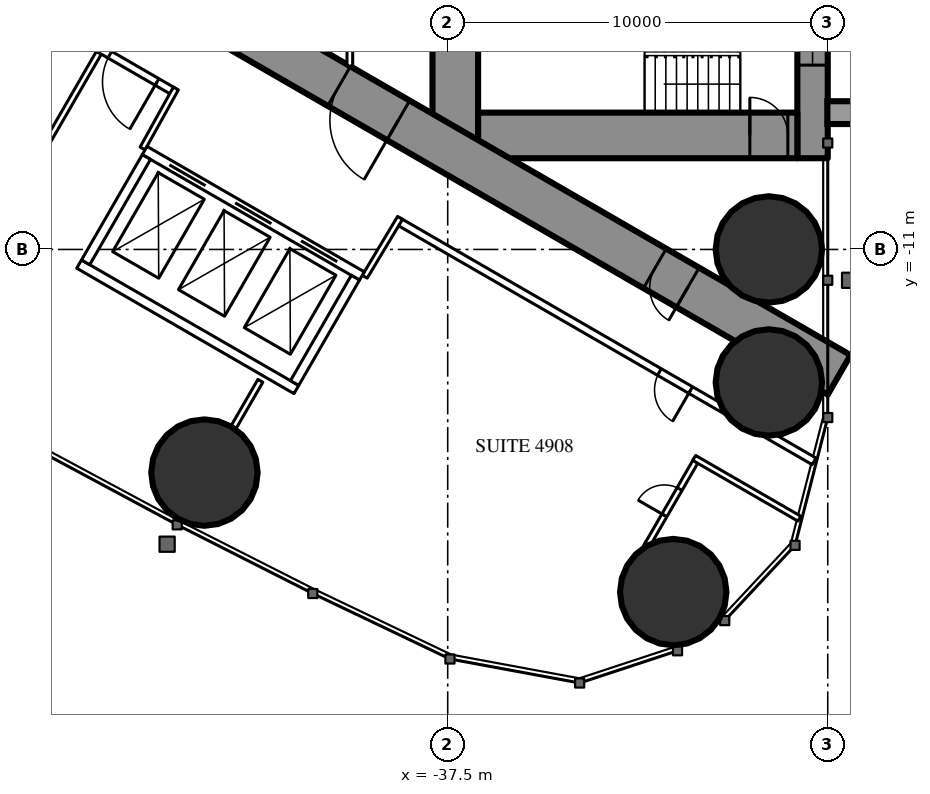
"""IFC4 building model, lengths in metres.
Left out: names, types, materials, properties, quantities, classifications, styles, units other than length and angle.
Written with IfcOpenShell. Run it as: python <this file> out.ifc"""

import sys

from ifc_helpers import new_model, si_unit, direction, frame, frame_2d, origin, origin_2d, place, context, subcontext, project, spatial, rectangle, circle, extrude, element, fill, save


model = new_model("IFC4")
c1 = context("Model", 3, precision=1e-05, world=origin(), true_north=direction((0.0, 1.0)))
c2 = subcontext(c1, "Body", "Model", "MODEL_VIEW")
j1 = project(units=[si_unit("LENGTHUNIT", "METRE"), si_unit("PLANEANGLEUNIT", "RADIAN")], contexts=[c1])
p1 = place(None, origin())
s1 = spatial("IfcSite", under=j1, at=p1, CompositionType="ELEMENT")
p2 = place(p1, origin())
s2 = spatial("IfcBuilding", under=s1, at=p2, CompositionType="ELEMENT")
p3 = place(p2, frame((0.0, 0.0, 184.3)))
s3 = spatial("IfcBuildingStorey", under=s2, at=p3, CompositionType="ELEMENT", Elevation=184.3)
for number, where, z_axis, x_axis in (
    (1, (-31.565, -20.016, 0.0), (0.0, 0.0, 1.0), (1.0, 0.0, 0.0)),
    (2, (-29.05, -11.0, 0.0), (0.0, 0.0, 1.0), (1.0, 0.0, 0.0)),
    (3, (-29.05, -14.5, 0.0), (0.0, 0.0, 1.0), (1.0, 0.0, 0.0)),
    (4, (-43.9, -16.871, 0.0), (0.0, 0.0, 1.0), (1.0, 0.0, 0.0)),
):
    element("IfcColumn", number, at=place(p3, frame(where, z_axis=z_axis, x_axis=x_axis)), inside=s3, PredefinedType="COLUMN", context=c2, shape_type="SweptSolid", body=[
        extrude(circle(Radius=1.4, at=origin_2d()), origin(), (0.0, 0.0, 1.0), 3.5),
    ])
p4 = place(p3, frame((-27.9, 8.6, 0.0), z_axis=(0.0, 0.0, 1.0), x_axis=(0.0, -1.0, 0.0)))
e5 = element("IfcWall", 5, at=p4, inside=s3, PredefinedType="SHEAR", context=c2, shape_type="SweptSolid", body=[
    extrude(rectangle(XDim=17.2, YDim=0.8, at=frame_2d((8.6, 0.0))), origin(), (0.0, 0.0, 1.0), 3.5),
])
p5 = place(p4, frame((2.45, 0.0, 0.6)))
e6 = element("IfcOpeningElement", 6, at=p5, cuts=e5, PredefinedType="OPENING", context=c2, shape_type="SweptSolid", body=[
    extrude(rectangle(XDim=0.6, YDim=2.1, at=frame_2d((0.3, 1.05))), frame((0.0, 0.41, 0.0), z_axis=(0.0, -1.0, 0.0), x_axis=(1.0, 0.0, 0.0)), (0.0, 0.0, 1.0), 0.82),
])
p6 = place(p4, frame((14.15, 0.0, 0.6)))
e7 = element("IfcOpeningElement", 7, at=p6, cuts=e5, PredefinedType="OPENING", context=c2, shape_type="SweptSolid", body=[
    extrude(rectangle(XDim=0.6, YDim=2.1, at=frame_2d((0.3, 1.05))), frame((0.0, 0.41, 0.0), z_axis=(0.0, -1.0, 0.0), x_axis=(1.0, 0.0, 0.0)), (0.0, 0.0, 1.0), 0.82),
])
p7 = place(p3, frame((-37.3, 8.6, 0.0), z_axis=(0.0, 0.0, 1.0), x_axis=(0.0, -1.0, 0.0)))
e8 = element("IfcWall", 8, at=p7, inside=s3, PredefinedType="SHEAR", context=c2, shape_type="SweptSolid", body=[
    extrude(rectangle(XDim=17.2, YDim=1.2, at=frame_2d((8.6, 0.0))), origin(), (0.0, 0.0, 1.0), 3.5),
])
p8 = place(p7, frame((7.7, 0.0, 0.0)))
e9 = element("IfcOpeningElement", 9, at=p8, cuts=e8, PredefinedType="OPENING", context=c2, shape_type="SweptSolid", body=[
    extrude(rectangle(XDim=1.8, YDim=2.2, at=frame_2d((0.9, 1.1))), frame((0.0, 0.61, 0.0), z_axis=(0.0, -1.0, 0.0), x_axis=(1.0, 0.0, 0.0)), (0.0, 0.0, 1.0), 1.22),
])
p9 = place(p3, frame((-28.3, -8.0, 0.0), z_axis=(0.0, 0.0, 1.0), x_axis=(-1.0, 0.0, 0.0)))
e10 = element("IfcWall", 10, at=p9, inside=s3, PredefinedType="SHEAR", context=c2, shape_type="SweptSolid", body=[
    extrude(rectangle(XDim=8.4, YDim=1.2, at=frame_2d((4.2, 0.0))), origin(), (0.0, 0.0, 1.0), 3.5),
])
p10 = place(p9, frame((0.25, 0.0, 0.0)))
e11 = element("IfcOpeningElement", 11, at=p10, cuts=e10, PredefinedType="OPENING", context=c2, shape_type="SweptSolid", body=[
    extrude(rectangle(XDim=1.0, YDim=2.2, at=frame_2d((0.5, 1.1))), frame((0.0, 0.61, 0.0), z_axis=(0.0, -1.0, 0.0), x_axis=(1.0, 0.0, 0.0)), (0.0, 0.0, 1.0), 1.22),
])
p11 = place(p3, frame((-27.2, -14.3, 0.0), z_axis=(0.0, 0.0, 1.0), x_axis=(-0.866024021859, 0.500002393557, 0.0)))
e12 = element("IfcWall", 12, at=p11, inside=s3, PredefinedType="SHEAR", context=c2, shape_type="SweptSolid", body=[
    extrude(rectangle(XDim=27.907, YDim=1.2, at=frame_2d((13.954, 0.0))), origin(), (0.0, 0.0, 1.0), 3.5),
])
p12 = place(p11, frame((4.6, 0.0, 0.0)))
e13 = element("IfcOpeningElement", 13, at=p12, cuts=e12, PredefinedType="OPENING", context=c2, shape_type="SweptSolid", body=[
    extrude(rectangle(XDim=1.0, YDim=2.2, at=frame_2d((0.5, 1.1))), frame((0.0, 0.61, 0.0), z_axis=(0.0, -1.0, 0.0), x_axis=(1.0, 0.0, 0.0)), (0.0, 0.0, 1.0), 1.22),
])
p13 = place(p11, frame((13.395, 0.0, 0.0)))
e14 = element("IfcOpeningElement", 14, at=p13, cuts=e12, PredefinedType="OPENING", context=c2, shape_type="SweptSolid", body=[
    extrude(rectangle(XDim=1.8, YDim=2.2, at=frame_2d((0.9, 1.1))), frame((0.0, 0.61, 0.0), z_axis=(0.0, -1.0, 0.0), x_axis=(1.0, 0.0, 0.0)), (0.0, 0.0, 1.0), 1.22),
])
p14 = place(p3, frame((-46.679, -5.825, 0.0), z_axis=(0.0, 0.0, 1.0), x_axis=(-0.500006839597, -0.866021454905, 0.0)))
e15 = element("IfcWall", 15, at=p14, inside=s3, PredefinedType="PARTITIONING", context=c2, shape_type="SweptSolid", body=[
    extrude(rectangle(XDim=6.911, YDim=0.15, at=frame_2d((3.456, 0.0))), origin(), (0.0, 0.0, 1.0), 2.3),
])
p15 = place(p3, frame((-42.429, -14.457, 0.0), z_axis=(0.0, 0.0, 1.0), x_axis=(-0.5000578829, -0.865991982497, 0.0)))
e16 = element("IfcWall", 16, at=p15, inside=s3, PredefinedType="PARTITIONING", context=c2, shape_type="SweptSolid", body=[
    extrude(rectangle(XDim=1.407, YDim=0.15, at=frame_2d((0.704, 0.0))), origin(), (0.0, 0.0, 1.0), 3.25),
])
p16 = place(p3, frame((-27.86, -16.575, 0.0), z_axis=(0.0, 0.0, 1.0), x_axis=(-0.866027756871, 0.499995924312, 0.0)))
e17 = element("IfcWall", 17, at=p16, inside=s3, PredefinedType="PARTITIONING", context=c2, shape_type="SweptSolid", body=[
    extrude(rectangle(XDim=12.622, YDim=0.2, at=frame_2d((6.311, 0.0))), origin(), (0.0, 0.0, 1.0), 3.25),
])
p17 = place(p16, frame((3.75, 0.0, 0.0)))
e18 = element("IfcOpeningElement", 18, at=p17, cuts=e17, PredefinedType="OPENING", context=c2, shape_type="SweptSolid", body=[
    extrude(rectangle(XDim=0.95, YDim=2.2, at=frame_2d((0.475, 1.1))), frame((0.0, 0.11, 0.0), z_axis=(0.0, -1.0, 0.0), x_axis=(1.0, 0.0, 0.0)), (0.0, 0.0, 1.0), 0.22),
])
p18 = place(p3, frame((-44.715, -6.844, 0.0), z_axis=(0.0, 0.0, 1.0), x_axis=(-0.866025261224, 0.500000246922, 0.0)))
e19 = element("IfcWall", 19, at=p18, inside=s3, PredefinedType="PARTITIONING", context=c2, shape_type="SweptSolid", body=[
    extrude(rectangle(XDim=13.567, YDim=0.2, at=frame_2d((6.783, 0.0))), origin(), (0.0, 0.0, 1.0), 3.25),
])
p19 = place(p18, frame((10.579, 0.0, 0.0)))
e20 = element("IfcOpeningElement", 20, at=p19, cuts=e19, PredefinedType="OPENING", context=c2, shape_type="SweptSolid", body=[
    extrude(rectangle(XDim=0.95, YDim=2.2, at=frame_2d((0.475, 1.1))), frame((0.0, 0.11, 0.0), z_axis=(0.0, -1.0, 0.0), x_axis=(1.0, 0.0, 0.0)), (0.0, 0.0, 1.0), 0.22),
])
p20 = place(p18, frame((6.529, 0.0, 0.0)))
e21 = element("IfcOpeningElement", 21, at=p20, cuts=e19, PredefinedType="OPENING", context=c2, shape_type="SweptSolid", body=[
    extrude(rectangle(XDim=0.95, YDim=2.2, at=frame_2d((0.475, 1.1))), frame((0.0, 0.11, 0.0), z_axis=(0.0, -1.0, 0.0), x_axis=(1.0, 0.0, 0.0)), (0.0, 0.0, 1.0), 0.22),
])
p21 = place(p18, frame((0.5, 0.0, 0.0)))
e22 = element("IfcOpeningElement", 22, at=p21, cuts=e19, PredefinedType="OPENING", context=c2, shape_type="SweptSolid", body=[
    extrude(rectangle(XDim=1.435, YDim=2.2, at=frame_2d((0.718, 1.1))), frame((0.0, 0.11, 0.0), z_axis=(0.0, -1.0, 0.0), x_axis=(1.0, 0.0, 0.0)), (0.0, 0.0, 1.0), 0.22),
])
for number, where, z_axis, x_axis in (
    (23, (-39.683, -11.718, 0.0), (0.0, 0.0, 1.0), (0.514, 0.858, 0.0)),
    (24, (-44.652, -6.764, 0.0), (0.0, 0.0, 1.0), (-0.485, -0.874, 0.0)),
):
    element("IfcWall", number, at=place(p3, frame(where, z_axis=z_axis, x_axis=x_axis)), inside=s3, PredefinedType="PARTITIONING", context=c2, shape_type="SweptSolid", body=[
        extrude(rectangle(XDim=1.805, YDim=0.15, at=frame_2d((0.903, 0.0))), origin(), (0.0, 0.0, 1.0), 3.25),
    ])
p22 = place(p3, frame((-30.17, -19.975, 0.0), z_axis=(0.0, 0.0, 1.0), x_axis=(-0.866006523861, 0.500032699561, 0.0)))
e25 = element("IfcWall", 25, at=p22, inside=s3, PredefinedType="PARTITIONING", context=c2, shape_type="SweptSolid", body=[
    extrude(rectangle(XDim=2.475, YDim=0.15, at=frame_2d((1.237, 0.0))), origin(), (0.0, 0.0, 1.0), 3.25),
])
p23 = place(p3, frame((-30.948, -16.524, 0.0), z_axis=(0.0, 0.0, 1.0), x_axis=(-0.500006934395, -0.866021400173, 0.0)))
e26 = element("IfcWall", 26, at=p23, inside=s3, PredefinedType="PARTITIONING", context=c2, shape_type="SweptSolid", body=[
    extrude(rectangle(XDim=2.6, YDim=0.15, at=frame_2d((1.3, 0.0))), origin(), (0.0, 0.0, 1.0), 2.3),
])
p24 = place(p23, frame((0.9, 0.0, 0.0)))
e27 = element("IfcOpeningElement", 27, at=p24, cuts=e26, PredefinedType="OPENING", context=c2, shape_type="SweptSolid", body=[
    extrude(rectangle(XDim=0.8, YDim=2.2, at=frame_2d((0.4, 1.1))), frame((0.0, 0.085, 0.0), z_axis=(0.0, -1.0, 0.0), x_axis=(1.0, 0.0, 0.0)), (0.0, 0.0, 1.0), 0.17),
])
p25 = place(p3, frame((-28.246, -18.084, 0.0), z_axis=(0.0, 0.0, 1.0), x_axis=(-0.866029063467, 0.49999366119, 0.0)))
e28 = element("IfcWall", 28, at=p25, inside=s3, PredefinedType="PARTITIONING", context=c2, shape_type="SweptSolid", body=[
    extrude(rectangle(XDim=3.195, YDim=0.15, at=frame_2d((1.597, 0.0))), origin(), (0.0, 0.0, 1.0), 3.25),
])
p26 = place(p3, frame((-40.075, 1.2, 0.0), z_axis=(0.0, 0.0, 1.0), x_axis=(0.0, -1.0, 0.0)))
e29 = element("IfcWall", 29, at=p26, inside=s3, PredefinedType="PARTITIONING", context=c2, shape_type="SweptSolid", body=[
    extrude(rectangle(XDim=7.374, YDim=0.15, at=frame_2d((3.687, 0.0))), origin(), (0.0, 0.0, 1.0), 3.25),
])
p27 = place(p26, frame((2.787, 0.0, 0.0)))
e30 = element("IfcOpeningElement", 30, at=p27, cuts=e29, PredefinedType="OPENING", context=c2, shape_type="SweptSolid", body=[
    extrude(rectangle(XDim=1.8, YDim=2.2, at=frame_2d((0.9, 1.1))), frame((0.0, 0.085, 0.0), z_axis=(0.0, -1.0, 0.0), x_axis=(1.0, 0.0, 0.0)), (0.0, 0.0, 1.0), 0.17),
])
p28 = place(p3, frame((-39.758, -11.697, 0.0), z_axis=(0.0, 0.0, 1.0), x_axis=(-0.866024194504, 0.500002094529, 0.0)))
e31 = element("IfcWall", 31, at=p28, inside=s3, PredefinedType="PARTITIONING", context=c2, shape_type="SweptSolid", body=[
    extrude(rectangle(XDim=6.6, YDim=0.25, at=frame_2d((3.3, 0.0))), origin(), (0.0, 0.0, 1.0), 3.25),
])
p29 = place(p28, frame((0.75, 0.0, 0.0)))
e32 = element("IfcOpeningElement", 32, at=p29, cuts=e31, PredefinedType="OPENING", context=c2, shape_type="SweptSolid", body=[
    extrude(rectangle(XDim=1.1, YDim=2.2, at=frame_2d((0.55, 1.1))), frame((0.0, 0.135, 0.0), z_axis=(0.0, -1.0, 0.0), x_axis=(1.0, 0.0, 0.0)), (0.0, 0.0, 1.0), 0.27),
])
p30 = place(p28, frame((2.75, 0.0, 0.0)))
e33 = element("IfcOpeningElement", 33, at=p30, cuts=e31, PredefinedType="OPENING", context=c2, shape_type="SweptSolid", body=[
    extrude(rectangle(XDim=1.1, YDim=2.2, at=frame_2d((0.55, 1.1))), frame((0.0, 0.135, 0.0), z_axis=(0.0, -1.0, 0.0), x_axis=(1.0, 0.0, 0.0)), (0.0, 0.0, 1.0), 0.27),
])
p31 = place(p28, frame((4.75, 0.0, 0.0)))
e34 = element("IfcOpeningElement", 34, at=p31, cuts=e31, PredefinedType="OPENING", context=c2, shape_type="SweptSolid", body=[
    extrude(rectangle(XDim=1.1, YDim=2.2, at=frame_2d((0.55, 1.1))), frame((0.0, 0.135, 0.0), z_axis=(0.0, -1.0, 0.0), x_axis=(1.0, 0.0, 0.0)), (0.0, 0.0, 1.0), 0.27),
])
p32 = place(p3, frame((-41.482, -14.686, 0.0), z_axis=(0.0, 0.0, 1.0), x_axis=(-0.86603344179, 0.499986077507, 0.0)))
e35 = element("IfcWall", 35, at=p32, inside=s3, PredefinedType="PARTITIONING", context=c2, shape_type="SweptSolid", body=[
    extrude(rectangle(XDim=6.6, YDim=0.25, at=frame_2d((3.3, 0.0))), origin(), (0.0, 0.0, 1.0), 3.25),
])
for number, where, z_axis, x_axis in (
    (36, (-39.928, -11.743, 0.0), (0.0, 0.0, 1.0), (-0.5, -0.866, 0.0)),
    (37, (-45.428, -8.568, 0.0), (0.0, 0.0, 1.0), (-0.5, -0.866, 0.0)),
):
    element("IfcWall", number, at=place(p3, frame(where, z_axis=z_axis, x_axis=x_axis)), inside=s3, PredefinedType="PARTITIONING", context=c2, shape_type="SweptSolid", body=[
        extrude(rectangle(XDim=3.201, YDim=0.25, at=frame_2d((1.6, 0.0))), origin(), (0.0, 0.0, 1.0), 3.25),
    ])
p33 = place(p24, origin())
e38 = element("IfcDoor", 38, at=p33, inside=s3, OperationType="SINGLE_SWING_RIGHT", PredefinedType="DOOR", context=c2, shape_type="SweptSolid", body=[
    extrude(rectangle(XDim=0.8, YDim=2.2, at=frame_2d((0.4, 1.1))), frame((0.0, 0.025, 0.0), z_axis=(0.0, -1.0, 0.0), x_axis=(1.0, 0.0, 0.0)), (0.0, 0.0, 1.0), 0.05),
])
fill(e27, e38)
p34 = place(p17, origin())
e39 = element("IfcDoor", 39, at=p34, inside=s3, OperationType="SINGLE_SWING_LEFT", PredefinedType="DOOR", context=c2, shape_type="SweptSolid", body=[
    extrude(rectangle(XDim=0.95, YDim=2.2, at=frame_2d((0.475, 1.1))), frame((0.0, 0.025, 0.0), z_axis=(0.0, -1.0, 0.0), x_axis=(1.0, 0.0, 0.0)), (0.0, 0.0, 1.0), 0.05),
])
fill(e18, e39)
p35 = place(p21, origin())
e40 = element("IfcDoor", 40, at=p35, inside=s3, OperationType="SINGLE_SWING_LEFT", PredefinedType="DOOR", context=c2, shape_type="SweptSolid", body=[
    extrude(rectangle(XDim=1.435, YDim=2.2, at=frame_2d((0.718, 1.1))), frame((0.0, 0.025, 0.0), z_axis=(0.0, -1.0, 0.0), x_axis=(1.0, 0.0, 0.0)), (0.0, 0.0, 1.0), 0.05),
])
fill(e22, e40)
p36 = place(p12, origin())
e41 = element("IfcDoor", 41, at=p36, inside=s3, OperationType="SINGLE_SWING_LEFT", PredefinedType="DOOR", context=c2, shape_type="SweptSolid", body=[
    extrude(rectangle(XDim=1.0, YDim=2.2, at=frame_2d((0.5, 1.1))), frame((0.0, 0.025, 0.0), z_axis=(0.0, -1.0, 0.0), x_axis=(1.0, 0.0, 0.0)), (0.0, 0.0, 1.0), 0.05),
])
fill(e13, e41)
p37 = place(p13, origin())
e42 = element("IfcDoor", 42, at=p37, inside=s3, OperationType="DOUBLE_DOOR_SINGLE_SWING", PredefinedType="DOOR", context=c2, shape_type="SweptSolid", body=[
    extrude(rectangle(XDim=1.8, YDim=2.2, at=frame_2d((0.9, 1.1))), frame((0.0, 0.025, 0.0), z_axis=(0.0, -1.0, 0.0), x_axis=(1.0, 0.0, 0.0)), (0.0, 0.0, 1.0), 0.05),
])
fill(e14, e42)
p38 = place(p10, origin())
e43 = element("IfcDoor", 43, at=p38, inside=s3, OperationType="SINGLE_SWING_RIGHT", PredefinedType="DOOR", context=c2, shape_type="SweptSolid", body=[
    extrude(rectangle(XDim=1.0, YDim=2.2, at=frame_2d((0.5, 1.1))), frame((0.0, 0.025, 0.0), z_axis=(0.0, -1.0, 0.0), x_axis=(1.0, 0.0, 0.0)), (0.0, 0.0, 1.0), 0.05),
])
fill(e11, e43)
p39 = place(p29, origin())
e44 = element("IfcDoor", 44, at=p39, inside=s3, OperationType="DOUBLE_DOOR_SLIDING", PredefinedType="USERDEFINED", context=c2, shape_type="SweptSolid", body=[
    extrude(rectangle(XDim=1.1, YDim=2.2, at=frame_2d((0.55, 1.1))), frame((0.0, 0.025, 0.0), z_axis=(0.0, -1.0, 0.0), x_axis=(1.0, 0.0, 0.0)), (0.0, 0.0, 1.0), 0.05),
])
fill(e32, e44)
p40 = place(p30, origin())
e45 = element("IfcDoor", 45, at=p40, inside=s3, OperationType="DOUBLE_DOOR_SLIDING", PredefinedType="USERDEFINED", context=c2, shape_type="SweptSolid", body=[
    extrude(rectangle(XDim=1.1, YDim=2.2, at=frame_2d((0.55, 1.1))), frame((0.0, 0.025, 0.0), z_axis=(0.0, -1.0, 0.0), x_axis=(1.0, 0.0, 0.0)), (0.0, 0.0, 1.0), 0.05),
])
fill(e33, e45)
p41 = place(p31, origin())
e46 = element("IfcDoor", 46, at=p41, inside=s3, OperationType="DOUBLE_DOOR_SLIDING", PredefinedType="USERDEFINED", context=c2, shape_type="SweptSolid", body=[
    extrude(rectangle(XDim=1.1, YDim=2.2, at=frame_2d((0.55, 1.1))), frame((0.0, 0.025, 0.0), z_axis=(0.0, -1.0, 0.0), x_axis=(1.0, 0.0, 0.0)), (0.0, 0.0, 1.0), 0.05),
])
fill(e34, e46)
p42 = place(p6, origin())
e47 = element("IfcWindow", 47, at=p42, inside=s3, PartitioningType="SINGLE_PANEL", PredefinedType="WINDOW", context=c2, shape_type="SweptSolid", body=[
    extrude(rectangle(XDim=0.6, YDim=2.1, at=frame_2d((0.3, 1.05))), frame((0.0, 0.03, 0.0), z_axis=(0.0, -1.0, 0.0), x_axis=(1.0, 0.0, 0.0)), (0.0, 0.0, 1.0), 0.06),
])
fill(e7, e47)
save(model, sys.argv[1])
